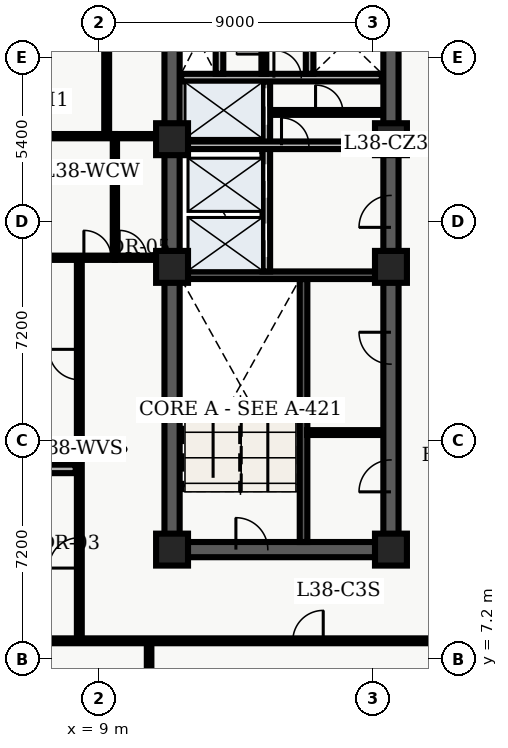
"""IFC4 building model, lengths in metres.
Left out: names, types, materials, properties, quantities, classifications, styles, units other than length and angle.
Written with IfcOpenShell. Run it as: python <this file> out.ifc"""

import sys

from ifc_helpers import new_model, entity, si_unit, converted_unit, direction, frame, origin_with_axes, origin_2d_with_axis, place, context, subcontext, project, spatial, polyline, rectangle, outline, extrude, element, fill, save


model = new_model("IFC4")
c1 = context("Model", 3, precision=1e-05, world=origin_with_axes(), true_north=direction((0.0, 1.0)))
c2 = subcontext(c1, "Body", "Model", "MODEL_VIEW")
j1 = project(units=[si_unit("LENGTHUNIT", "METRE"), converted_unit("PLANEANGLEUNIT", "DEGREE", entity("IfcPlaneAngleMeasure", 0.017), si_unit("PLANEANGLEUNIT", "RADIAN"), dimensions=[0, 0, 0, 0, 0, 0, 0])], contexts=[c1])
p1 = place(None, origin_with_axes())
s1 = spatial("IfcSite", under=j1, at=p1, CompositionType="ELEMENT")
p2 = place(p1, origin_with_axes())
s2 = spatial("IfcBuilding", under=s1, at=p2, CompositionType="ELEMENT")
p3 = place(p2, frame((0.0, 0.0, 156.3), z_axis=(0.0, 0.0, 1.0), x_axis=(1.0, 0.0, 0.0)))
s3 = spatial("IfcBuildingStorey", under=s2, at=p3, CompositionType="ELEMENT", Elevation=156.3)
p4 = place(p3, frame((11.4, 10.8, 0.0), z_axis=(0.0, 0.0, 1.0), x_axis=(0.0, 1.0, 0.0)))
e1 = element("IfcWall", 1, at=p4, inside=s3, PredefinedType="SHEAR", context=c2, shape_type="SweptSolid", body=[
    extrude(outline(polyline([(0.0, -0.25), (27.0, -0.25), (27.0, 0.25), (0.0, 0.25), (0.0, -0.25)])), origin_with_axes(), (0.0, 0.0, 1.0), 3.66),
])
p5 = place(p3, frame((11.4, 10.8, 0.0), z_axis=(0.0, 0.0, 1.0), x_axis=(1.0, 0.0, 0.0)))
e2 = element("IfcWall", 2, at=p5, inside=s3, PredefinedType="SHEAR", context=c2, shape_type="SweptSolid", body=[
    extrude(outline(polyline([(0.0, -0.25), (7.2, -0.25), (7.2, 0.25), (0.0, 0.25), (0.0, -0.25)])), origin_with_axes(), (0.0, 0.0, 1.0), 3.66),
])
p6 = place(p5, frame((2.625, 0.0, 0.0), z_axis=(0.0, 0.0, 1.0), x_axis=(1.0, 0.0, 0.0)))
e3 = element("IfcOpeningElement", 3, at=p6, cuts=e2, PredefinedType="OPENING", context=c2, shape_type="SweptSolid", body=[
    extrude(rectangle(XDim=1.05, YDim=0.52, at=origin_2d_with_axis()), origin_with_axes(), (0.0, 0.0, 1.0), 2.15),
])
p7 = place(p3, frame((18.6, 10.8, 0.0), z_axis=(0.0, 0.0, 1.0), x_axis=(0.0, 1.0, 0.0)))
e4 = element("IfcWall", 4, at=p7, inside=s3, PredefinedType="SHEAR", context=c2, shape_type="SweptSolid", body=[
    extrude(outline(polyline([(0.0, -0.25), (13.5, -0.25), (13.5, 0.25), (0.0, 0.25), (0.0, -0.25)])), origin_with_axes(), (0.0, 0.0, 1.0), 3.66),
])
p8 = place(p7, frame((11.125, 0.0, 0.0), z_axis=(0.0, 0.0, 1.0), x_axis=(1.0, 0.0, 0.0)))
e5 = element("IfcOpeningElement", 5, at=p8, cuts=e4, PredefinedType="OPENING", context=c2, shape_type="SweptSolid", body=[
    extrude(rectangle(XDim=1.05, YDim=0.52, at=origin_2d_with_axis()), origin_with_axes(), (0.0, 0.0, 1.0), 2.15),
])
p9 = place(p7, frame((2.425, 0.0, 0.0), z_axis=(0.0, 0.0, 1.0), x_axis=(1.0, 0.0, 0.0)))
e6 = element("IfcOpeningElement", 6, at=p9, cuts=e4, PredefinedType="OPENING", context=c2, shape_type="SweptSolid", body=[
    extrude(rectangle(XDim=1.05, YDim=0.52, at=origin_2d_with_axis()), origin_with_axes(), (0.0, 0.0, 1.0), 2.15),
])
p10 = place(p7, frame((6.625, 0.0, 0.0), z_axis=(0.0, 0.0, 1.0), x_axis=(1.0, 0.0, 0.0)))
e7 = element("IfcOpeningElement", 7, at=p10, cuts=e4, PredefinedType="OPENING", context=c2, shape_type="SweptSolid", body=[
    extrude(rectangle(XDim=1.05, YDim=0.52, at=origin_2d_with_axis()), origin_with_axes(), (0.0, 0.0, 1.0), 2.15),
])
p11 = place(p3, frame((18.6, 24.3, 0.0), z_axis=(0.0, 0.0, 1.0), x_axis=(0.0, 1.0, 0.0)))
e8 = element("IfcWall", 8, at=p11, inside=s3, PredefinedType="SHEAR", context=c2, shape_type="SweptSolid", body=[
    extrude(outline(polyline([(0.0, -0.25), (13.5, -0.25), (13.5, 0.25), (0.0, 0.25), (0.0, -0.25)])), origin_with_axes(), (0.0, 0.0, 1.0), 3.66),
])
p12 = place(p11, frame((5.65, 0.0, 0.0), z_axis=(0.0, 0.0, 1.0), x_axis=(1.0, 0.0, 0.0)))
e9 = element("IfcOpeningElement", 9, at=p12, cuts=e8, PredefinedType="OPENING", context=c2, shape_type="SweptSolid", body=[
    extrude(rectangle(XDim=1.1, YDim=0.52, at=origin_2d_with_axis()), origin_with_axes(), (0.0, 0.0, 1.0), 2.15),
])
p13 = place(p11, frame((7.75, 0.0, 0.0), z_axis=(0.0, 0.0, 1.0), x_axis=(1.0, 0.0, 0.0)))
e10 = element("IfcOpeningElement", 10, at=p13, cuts=e8, PredefinedType="OPENING", context=c2, shape_type="SweptSolid", body=[
    extrude(rectangle(XDim=1.1, YDim=0.52, at=origin_2d_with_axis()), origin_with_axes(), (0.0, 0.0, 1.0), 2.15),
])
p14 = place(p3, frame((15.725, 11.05, 0.0), z_axis=(0.0, 0.0, 1.0), x_axis=(0.0, 1.0, 0.0)))
e11 = element("IfcWall", 11, at=p14, inside=s3, PredefinedType="SHEAR", context=c2, shape_type="SweptSolid", body=[
    extrude(outline(polyline([(0.0, -0.125), (8.65, -0.125), (8.65, 0.125), (0.0, 0.125), (0.0, -0.125)])), origin_with_axes(), (0.0, 0.0, 1.0), 3.66),
])
p15 = place(p3, frame((11.65, 19.825, 0.0), z_axis=(0.0, 0.0, 1.0), x_axis=(1.0, 0.0, 0.0)))
e12 = element("IfcWall", 12, at=p15, inside=s3, PredefinedType="SHEAR", context=c2, shape_type="SweptSolid", body=[
    extrude(outline(polyline([(0.0, -0.125), (6.7, -0.125), (6.7, 0.125), (0.0, 0.125), (0.0, -0.125)])), origin_with_axes(), (0.0, 0.0, 1.0), 3.66),
])
p16 = place(p3, frame((14.5, 19.95, 0.0), z_axis=(0.0, 0.0, 1.0), x_axis=(0.0, 1.0, 0.0)))
e13 = element("IfcWall", 13, at=p16, inside=s3, PredefinedType="SOLIDWALL", context=c2, shape_type="SweptSolid", body=[
    extrude(outline(polyline([(0.0, -0.125), (6.25, -0.125), (6.25, 0.125), (0.0, 0.125), (0.0, -0.125)])), origin_with_axes(), (0.0, 0.0, 1.0), 2.7),
])
p17 = place(p16, frame((1.025, 0.0, 0.0), z_axis=(0.0, 0.0, 1.0), x_axis=(1.0, 0.0, 0.0)))
e14 = element("IfcOpeningElement", 14, at=p17, cuts=e13, PredefinedType="OPENING", context=c2, shape_type="SweptSolid", body=[
    extrude(rectangle(XDim=1.1, YDim=0.27, at=origin_2d_with_axis()), origin_with_axes(), (0.0, 0.0, 1.0), 2.15),
])
p18 = place(p16, frame((2.975, 0.0, 0.0), z_axis=(0.0, 0.0, 1.0), x_axis=(1.0, 0.0, 0.0)))
e15 = element("IfcOpeningElement", 15, at=p18, cuts=e13, PredefinedType="OPENING", context=c2, shape_type="SweptSolid", body=[
    extrude(rectangle(XDim=1.1, YDim=0.27, at=origin_2d_with_axis()), origin_with_axes(), (0.0, 0.0, 1.0), 2.15),
])
p19 = place(p16, frame((5.425, 0.0, 0.0), z_axis=(0.0, 0.0, 1.0), x_axis=(1.0, 0.0, 0.0)))
e16 = element("IfcOpeningElement", 16, at=p19, cuts=e13, PredefinedType="OPENING", context=c2, shape_type="SweptSolid", body=[
    extrude(rectangle(XDim=1.2, YDim=0.27, at=origin_2d_with_axis()), origin_with_axes(), (0.0, 0.0, 1.0), 2.15),
])
p20 = place(p3, frame((11.7, 24.1, 0.0), z_axis=(0.0, 0.0, 1.0), x_axis=(1.0, 0.0, 0.0)))
e17 = element("IfcWall", 17, at=p20, inside=s3, PredefinedType="SOLIDWALL", context=c2, shape_type="SweptSolid", body=[
    extrude(outline(polyline([(0.0, -0.125), (6.6, -0.125), (6.6, 0.125), (0.0, 0.125), (0.0, -0.125)])), origin_with_axes(), (0.0, 0.0, 1.0), 2.7),
])
p21 = place(p20, frame((3.75, 0.0, 0.0), z_axis=(0.0, 0.0, 1.0), x_axis=(1.0, 0.0, 0.0)))
e18 = element("IfcOpeningElement", 18, at=p21, cuts=e17, PredefinedType="OPENING", context=c2, shape_type="SweptSolid", body=[
    extrude(rectangle(XDim=0.9, YDim=0.27, at=origin_2d_with_axis()), origin_with_axes(), (0.0, 0.0, 1.0), 2.15),
])
p22 = place(p3, frame((11.7, 26.325, 0.0), z_axis=(0.0, 0.0, 1.0), x_axis=(1.0, 0.0, 0.0)))
e19 = element("IfcWall", 19, at=p22, inside=s3, PredefinedType="SOLIDWALL", context=c2, shape_type="SweptSolid", body=[
    extrude(outline(polyline([(0.0, -0.125), (6.6, -0.125), (6.6, 0.125), (0.0, 0.125), (0.0, -0.125)])), origin_with_axes(), (0.0, 0.0, 1.0), 2.7),
])
p23 = place(p22, frame((3.5, 0.0, 0.0), z_axis=(0.0, 0.0, 1.0), x_axis=(1.0, 0.0, 0.0)))
e20 = element("IfcOpeningElement", 20, at=p23, cuts=e19, PredefinedType="OPENING", context=c2, shape_type="SweptSolid", body=[
    extrude(rectangle(XDim=0.9, YDim=0.27, at=origin_2d_with_axis()), origin_with_axes(), (0.0, 0.0, 1.0), 2.15),
])
for number, where, z_axis, x_axis in (
    (21, (12.96, 26.45, 0.0), (0.0, 0.0, 1.0), (0.0, 1.0, 0.0)),
    (22, (15.925, 26.45, 0.0), (0.0, 0.0, 1.0), (0.0, 1.0, 0.0)),
):
    element("IfcWall", number, at=place(p3, frame(where, z_axis=z_axis, x_axis=x_axis)), inside=s3, PredefinedType="SOLIDWALL", context=c2, shape_type="SweptSolid", body=[
        extrude(outline(polyline([(0.0, -0.125), (2.2, -0.125), (2.2, 0.125), (0.0, 0.125), (0.0, -0.125)])), origin_with_axes(), (0.0, 0.0, 1.0), 2.7),
    ])
for number, where, z_axis, x_axis in (
    (23, (11.4, 10.8, 0.0), (0.0, 0.0, 1.0), (1.0, 0.0, 0.0)),
    (24, (11.4, 20.1, 0.0), (0.0, 0.0, 1.0), (1.0, 0.0, 0.0)),
    (25, (11.4, 24.3, 0.0), (0.0, 0.0, 1.0), (1.0, 0.0, 0.0)),
    (26, (18.6, 10.8, 0.0), (0.0, 0.0, 1.0), (1.0, 0.0, 0.0)),
    (27, (18.6, 20.1, 0.0), (0.0, 0.0, 1.0), (1.0, 0.0, 0.0)),
    (28, (18.6, 24.3, 0.0), (0.0, 0.0, 1.0), (1.0, 0.0, 0.0)),
):
    element("IfcColumn", number, at=place(p3, frame(where, z_axis=z_axis, x_axis=x_axis)), inside=s3, PredefinedType="COLUMN", context=c2, shape_type="SweptSolid", body=[
        extrude(rectangle(XDim=1.05, YDim=1.05, at=origin_2d_with_axis()), origin_with_axes(), (0.0, 0.0, 1.0), 3.9),
    ])
p24 = place(p3, frame((14.62, 25.18, 0.0), z_axis=(0.0, 0.0, 1.0), x_axis=(1.0, 0.0, 0.0)))
e29 = element("IfcWall", 29, at=p24, inside=s3, PredefinedType="PARTITIONING", context=c2, shape_type="SweptSolid", body=[
    extrude(outline(polyline([(0.0, -0.08), (3.68, -0.08), (3.68, 0.08), (0.0, 0.08), (0.0, -0.08)])), origin_with_axes(), (0.0, 0.0, 1.0), 2.7),
])
p25 = place(p24, frame((1.95, 0.0, 0.0), z_axis=(0.0, 0.0, 1.0), x_axis=(1.0, 0.0, 0.0)))
e30 = element("IfcOpeningElement", 30, at=p25, cuts=e29, PredefinedType="OPENING", context=c2, shape_type="SweptSolid", body=[
    extrude(rectangle(XDim=0.9, YDim=0.18, at=origin_2d_with_axis()), origin_with_axes(), (0.0, 0.0, 1.0), 2.15),
])
p26 = place(p3, frame((14.42, 26.45, 0.0), z_axis=(0.0, 0.0, 1.0), x_axis=(0.0, 1.0, 0.0)))
e31 = element("IfcWall", 31, at=p26, inside=s3, PredefinedType="PARTITIONING", context=c2, shape_type="SweptSolid", body=[
    extrude(outline(polyline([(0.0, -0.08), (2.2, -0.08), (2.2, 0.08), (0.0, 0.08), (0.0, -0.08)])), origin_with_axes(), (0.0, 0.0, 1.0), 2.7),
])
p27 = place(p26, frame((1.1, 0.0, 0.0), z_axis=(0.0, 0.0, 1.0), x_axis=(1.0, 0.0, 0.0)))
e32 = element("IfcOpeningElement", 32, at=p27, cuts=e31, PredefinedType="OPENING", context=c2, shape_type="SweptSolid", body=[
    extrude(rectangle(XDim=0.9, YDim=0.18, at=origin_2d_with_axis()), origin_with_axes(), (0.0, 0.0, 1.0), 2.15),
])
p28 = place(p3, frame((15.84, 14.65, 0.0), z_axis=(0.0, 0.0, 1.0), x_axis=(1.0, 0.0, 0.0)))
e33 = element("IfcWall", 33, at=p28, inside=s3, PredefinedType="PARTITIONING", context=c2, shape_type="SweptSolid", body=[
    extrude(outline(polyline([(0.0, -0.08), (2.46, -0.08), (2.46, 0.08), (0.0, 0.08), (0.0, -0.08)])), origin_with_axes(), (0.0, 0.0, 1.0), 2.7),
])
p29 = place(p3, frame((9.52, 20.4, 0.0), z_axis=(0.0, 0.0, 1.0), x_axis=(0.0, 1.0, 0.0)))
e34 = element("IfcWall", 34, at=p29, inside=s3, PredefinedType="PARTITIONING", context=c2, shape_type="SweptSolid", body=[
    extrude(outline(polyline([(0.0, -0.07), (4.0, -0.07), (4.0, 0.07), (0.0, 0.07), (0.0, -0.07)])), origin_with_axes(), (0.0, 0.0, 1.0), 2.7),
])
p30 = place(p3, frame((9.52, 20.4, 0.0), z_axis=(0.0, 0.0, 1.0), x_axis=(1.0, 0.0, 0.0)))
e35 = element("IfcWall", 35, at=p30, inside=s3, PredefinedType="PARTITIONING", context=c2, shape_type="SweptSolid", body=[
    extrude(outline(polyline([(0.0, -0.07), (1.58, -0.07), (1.58, 0.07), (0.0, 0.07), (0.0, -0.07)])), origin_with_axes(), (0.0, 0.0, 1.0), 2.7),
])
p31 = place(p30, frame((0.59, 0.0, 0.0), z_axis=(0.0, 0.0, 1.0), x_axis=(1.0, 0.0, 0.0)))
e36 = element("IfcOpeningElement", 36, at=p31, cuts=e35, PredefinedType="OPENING", context=c2, shape_type="SweptSolid", body=[
    extrude(rectangle(XDim=0.9, YDim=0.16, at=origin_2d_with_axis()), origin_with_axes(), (0.0, 0.0, 1.0), 2.15),
])
p32 = place(p3, frame((9.52, 24.4, 0.0), z_axis=(0.0, 0.0, 1.0), x_axis=(1.0, 0.0, 0.0)))
e37 = element("IfcWall", 37, at=p32, inside=s3, PredefinedType="PARTITIONING", context=c2, shape_type="SweptSolid", body=[
    extrude(outline(polyline([(0.0, -0.07), (1.58, -0.07), (1.58, 0.07), (0.0, 0.07), (0.0, -0.07)])), origin_with_axes(), (0.0, 0.0, 1.0), 2.7),
])
p33 = place(p3, frame((2.6, 7.8, 0.0), z_axis=(0.0, 0.0, 1.0), x_axis=(1.0, 0.0, 0.0)))
e38 = element("IfcWall", 38, at=p33, inside=s3, PredefinedType="PARTITIONING", context=c2, shape_type="SweptSolid", body=[
    extrude(outline(polyline([(0.0, -0.08), (18.55, -0.08), (18.55, 0.08), (0.0, 0.08), (0.0, -0.08)])), origin_with_axes(), (0.0, 0.0, 1.0), 2.7),
])
p34 = place(p33, frame((3.737, 0.0, 0.0), z_axis=(0.0, 0.0, 1.0), x_axis=(1.0, 0.0, 0.0)))
e39 = element("IfcOpeningElement", 39, at=p34, cuts=e38, PredefinedType="OPENING", context=c2, shape_type="SweptSolid", body=[
    extrude(rectangle(XDim=1.0, YDim=0.18, at=origin_2d_with_axis()), origin_with_axes(), (0.0, 0.0, 1.0), 2.15),
])
p35 = place(p33, frame((13.273, 0.0, 0.0), z_axis=(0.0, 0.0, 1.0), x_axis=(1.0, 0.0, 0.0)))
e40 = element("IfcOpeningElement", 40, at=p35, cuts=e38, PredefinedType="OPENING", context=c2, shape_type="SweptSolid", body=[
    extrude(rectangle(XDim=1.0, YDim=0.18, at=origin_2d_with_axis()), origin_with_axes(), (0.0, 0.0, 1.0), 2.15),
])
p36 = place(p3, frame((8.35, 7.8, 0.0), z_axis=(0.0, 0.0, 1.0), x_axis=(0.0, 1.0, 0.0)))
e41 = element("IfcWall", 41, at=p36, inside=s3, PredefinedType="PARTITIONING", context=c2, shape_type="SweptSolid", body=[
    extrude(outline(polyline([(0.0, -0.08), (12.6, -0.08), (12.6, 0.08), (0.0, 0.08), (0.0, -0.08)])), origin_with_axes(), (0.0, 0.0, 1.0), 2.7),
])
p37 = place(p36, frame((2.893, 0.0, 0.0), z_axis=(0.0, 0.0, 1.0), x_axis=(1.0, 0.0, 0.0)))
e42 = element("IfcOpeningElement", 42, at=p37, cuts=e41, PredefinedType="OPENING", context=c2, shape_type="SweptSolid", body=[
    extrude(rectangle(XDim=1.0, YDim=0.18, at=origin_2d_with_axis()), origin_with_axes(), (0.0, 0.0, 1.0), 2.15),
])
p38 = place(p36, frame((9.088, 0.0, 0.0), z_axis=(0.0, 0.0, 1.0), x_axis=(1.0, 0.0, 0.0)))
e43 = element("IfcOpeningElement", 43, at=p38, cuts=e41, PredefinedType="OPENING", context=c2, shape_type="SweptSolid", body=[
    extrude(rectangle(XDim=1.0, YDim=0.18, at=origin_2d_with_axis()), origin_with_axes(), (0.0, 0.0, 1.0), 2.15),
])
p39 = place(p3, frame((9.25, 24.4, 0.0), z_axis=(0.0, 0.0, 1.0), x_axis=(0.0, 1.0, 0.0)))
e44 = element("IfcWall", 44, at=p39, inside=s3, PredefinedType="PARTITIONING", context=c2, shape_type="SweptSolid", body=[
    extrude(outline(polyline([(0.0, -0.08), (16.1, -0.08), (16.1, 0.08), (0.0, 0.08), (0.0, -0.08)])), origin_with_axes(), (0.0, 0.0, 1.0), 2.7),
])
p40 = place(p39, frame((3.567, 0.0, 0.0), z_axis=(0.0, 0.0, 1.0), x_axis=(1.0, 0.0, 0.0)))
e45 = element("IfcOpeningElement", 45, at=p40, cuts=e44, PredefinedType="OPENING", context=c2, shape_type="SweptSolid", body=[
    extrude(rectangle(XDim=1.0, YDim=0.18, at=origin_2d_with_axis()), origin_with_axes(), (0.0, 0.0, 1.0), 2.15),
])
p41 = place(p39, frame((11.512, 0.0, 0.0), z_axis=(0.0, 0.0, 1.0), x_axis=(1.0, 0.0, 0.0)))
e46 = element("IfcOpeningElement", 46, at=p41, cuts=e44, PredefinedType="OPENING", context=c2, shape_type="SweptSolid", body=[
    extrude(rectangle(XDim=1.0, YDim=0.18, at=origin_2d_with_axis()), origin_with_axes(), (0.0, 0.0, 1.0), 2.15),
])
p42 = place(p3, frame((0.335, 20.4, 0.0), z_axis=(0.0, 0.0, 1.0), x_axis=(1.0, 0.0, 0.0)))
e47 = element("IfcWall", 47, at=p42, inside=s3, PredefinedType="PARTITIONING", context=c2, shape_type="SweptSolid", body=[
    extrude(outline(polyline([(0.0, -0.07), (9.185, -0.07), (9.185, 0.07), (0.0, 0.07), (0.0, -0.07)])), origin_with_axes(), (0.0, 0.0, 1.0), 2.7),
])
p43 = place(p42, frame((8.615, 0.0, 0.0), z_axis=(0.0, 0.0, 1.0), x_axis=(1.0, 0.0, 0.0)))
e48 = element("IfcOpeningElement", 48, at=p43, cuts=e47, PredefinedType="OPENING", context=c2, shape_type="SweptSolid", body=[
    extrude(rectangle(XDim=0.9, YDim=0.16, at=origin_2d_with_axis()), origin_with_axes(), (0.0, 0.0, 1.0), 2.15),
])
p44 = place(p3, frame((0.335, 24.4, 0.0), z_axis=(0.0, 0.0, 1.0), x_axis=(1.0, 0.0, 0.0)))
e49 = element("IfcWall", 49, at=p44, inside=s3, PredefinedType="PARTITIONING", context=c2, shape_type="SweptSolid", body=[
    extrude(outline(polyline([(0.0, -0.07), (9.185, -0.07), (9.185, 0.07), (0.0, 0.07), (0.0, -0.07)])), origin_with_axes(), (0.0, 0.0, 1.0), 2.7),
])
p45 = place(p3, frame((0.335, 13.455, 0.0), z_axis=(0.0, 0.0, 1.0), x_axis=(1.0, 0.0, 0.0)))
e50 = element("IfcWall", 50, at=p45, inside=s3, PredefinedType="PARTITIONING", context=c2, shape_type="SweptSolid", body=[
    extrude(outline(polyline([(0.0, -0.14), (7.895, -0.14), (7.895, 0.14), (0.0, 0.14), (0.0, -0.14)])), origin_with_axes(), (0.0, 0.0, 1.0), 2.7),
])
p46 = place(p3, frame((10.645, 0.335, 0.0), z_axis=(0.0, 0.0, 1.0), x_axis=(0.0, 1.0, 0.0)))
e51 = element("IfcWall", 51, at=p46, inside=s3, PredefinedType="PARTITIONING", context=c2, shape_type="SweptSolid", body=[
    extrude(outline(polyline([(0.0, -0.075), (7.365, -0.075), (7.365, 0.075), (0.0, 0.075), (0.0, -0.075)])), origin_with_axes(), (0.0, 0.0, 1.0), 2.7),
])
p47 = place(p16, frame((1.025, 0.0, 0.0), z_axis=(0.0, 0.0, 1.0), x_axis=(1.0, 0.0, 0.0)))
e52 = element("IfcDoor", 52, at=p47, inside=s3, OperationType="SLIDING_TO_LEFT", PredefinedType="DOOR", context=c2, shape_type="SweptSolid", body=[
    extrude(rectangle(XDim=1.1, YDim=0.09, at=origin_2d_with_axis()), origin_with_axes(), (0.0, 0.0, 1.0), 2.15),
])
fill(e14, e52)
p48 = place(p16, frame((2.975, 0.0, 0.0), z_axis=(0.0, 0.0, 1.0), x_axis=(1.0, 0.0, 0.0)))
e53 = element("IfcDoor", 53, at=p48, inside=s3, OperationType="SLIDING_TO_RIGHT", PredefinedType="DOOR", context=c2, shape_type="SweptSolid", body=[
    extrude(rectangle(XDim=1.1, YDim=0.09, at=origin_2d_with_axis()), origin_with_axes(), (0.0, 0.0, 1.0), 2.15),
])
fill(e15, e53)
p49 = place(p16, frame((5.425, 0.0, 0.0), z_axis=(0.0, 0.0, 1.0), x_axis=(1.0, 0.0, 0.0)))
e54 = element("IfcDoor", 54, at=p49, inside=s3, OperationType="DOUBLE_DOOR_SLIDING", PredefinedType="DOOR", context=c2, shape_type="SweptSolid", body=[
    extrude(rectangle(XDim=1.2, YDim=0.09, at=origin_2d_with_axis()), origin_with_axes(), (0.0, 0.0, 1.0), 2.15),
])
fill(e16, e54)
p50 = place(p5, frame((2.625, 0.0, 0.0), z_axis=(0.0, 0.0, 1.0), x_axis=(1.0, 0.0, 0.0)))
e55 = element("IfcDoor", 55, at=p50, inside=s3, OperationType="SINGLE_SWING_LEFT", PredefinedType="DOOR", context=c2, shape_type="SweptSolid", body=[
    extrude(rectangle(XDim=1.05, YDim=0.09, at=origin_2d_with_axis()), origin_with_axes(), (0.0, 0.0, 1.0), 2.15),
])
fill(e3, e55)
p51 = place(p7, frame((11.125, 0.0, 0.0), z_axis=(0.0, 0.0, 1.0), x_axis=(1.0, 0.0, 0.0)))
e56 = element("IfcDoor", 56, at=p51, inside=s3, OperationType="SINGLE_SWING_LEFT", PredefinedType="DOOR", context=c2, shape_type="SweptSolid", body=[
    extrude(rectangle(XDim=1.05, YDim=0.09, at=origin_2d_with_axis()), origin_with_axes(), (0.0, 0.0, 1.0), 2.15),
])
fill(e5, e56)
p52 = place(p22, frame((3.5, 0.0, 0.0), z_axis=(0.0, 0.0, 1.0), x_axis=(1.0, 0.0, 0.0)))
e57 = element("IfcDoor", 57, at=p52, inside=s3, OperationType="SINGLE_SWING_LEFT", PredefinedType="DOOR", context=c2, shape_type="SweptSolid", body=[
    extrude(rectangle(XDim=0.9, YDim=0.09, at=origin_2d_with_axis()), origin_with_axes(), (0.0, 0.0, 1.0), 2.15),
])
fill(e20, e57)
p53 = place(p26, frame((1.1, 0.0, 0.0), z_axis=(0.0, 0.0, 1.0), x_axis=(1.0, 0.0, 0.0)))
e58 = element("IfcDoor", 58, at=p53, inside=s3, OperationType="SINGLE_SWING_LEFT", PredefinedType="DOOR", context=c2, shape_type="SweptSolid", body=[
    extrude(rectangle(XDim=0.9, YDim=0.09, at=origin_2d_with_axis()), origin_with_axes(), (0.0, 0.0, 1.0), 2.15),
])
fill(e32, e58)
p54 = place(p20, frame((3.75, 0.0, 0.0), z_axis=(0.0, 0.0, 1.0), x_axis=(1.0, 0.0, 0.0)))
e59 = element("IfcDoor", 59, at=p54, inside=s3, OperationType="SINGLE_SWING_LEFT", PredefinedType="DOOR", context=c2, shape_type="SweptSolid", body=[
    extrude(rectangle(XDim=0.9, YDim=0.09, at=origin_2d_with_axis()), origin_with_axes(), (0.0, 0.0, 1.0), 2.15),
])
fill(e18, e59)
p55 = place(p24, frame((1.95, 0.0, 0.0), z_axis=(0.0, 0.0, 1.0), x_axis=(1.0, 0.0, 0.0)))
e60 = element("IfcDoor", 60, at=p55, inside=s3, OperationType="SINGLE_SWING_LEFT", PredefinedType="DOOR", context=c2, shape_type="SweptSolid", body=[
    extrude(rectangle(XDim=0.9, YDim=0.09, at=origin_2d_with_axis()), origin_with_axes(), (0.0, 0.0, 1.0), 2.15),
])
fill(e30, e60)
p56 = place(p7, frame((2.425, 0.0, 0.0), z_axis=(0.0, 0.0, 1.0), x_axis=(1.0, 0.0, 0.0)))
e61 = element("IfcDoor", 61, at=p56, inside=s3, OperationType="SINGLE_SWING_LEFT", PredefinedType="DOOR", context=c2, shape_type="SweptSolid", body=[
    extrude(rectangle(XDim=1.05, YDim=0.09, at=origin_2d_with_axis()), origin_with_axes(), (0.0, 0.0, 1.0), 2.15),
])
fill(e6, e61)
p57 = place(p7, frame((6.625, 0.0, 0.0), z_axis=(0.0, 0.0, 1.0), x_axis=(1.0, 0.0, 0.0)))
e62 = element("IfcDoor", 62, at=p57, inside=s3, OperationType="SINGLE_SWING_RIGHT", PredefinedType="DOOR", context=c2, shape_type="SweptSolid", body=[
    extrude(rectangle(XDim=1.05, YDim=0.09, at=origin_2d_with_axis()), origin_with_axes(), (0.0, 0.0, 1.0), 2.15),
])
fill(e7, e62)
p58 = place(p30, frame((0.59, 0.0, 0.0), z_axis=(0.0, 0.0, 1.0), x_axis=(1.0, 0.0, 0.0)))
e63 = element("IfcDoor", 63, at=p58, inside=s3, OperationType="SINGLE_SWING_LEFT", PredefinedType="DOOR", context=c2, shape_type="SweptSolid", body=[
    extrude(rectangle(XDim=0.9, YDim=0.084, at=origin_2d_with_axis()), origin_with_axes(), (0.0, 0.0, 1.0), 2.15),
])
fill(e36, e63)
p59 = place(p42, frame((8.615, 0.0, 0.0), z_axis=(0.0, 0.0, 1.0), x_axis=(1.0, 0.0, 0.0)))
e64 = element("IfcDoor", 64, at=p59, inside=s3, OperationType="SINGLE_SWING_LEFT", PredefinedType="DOOR", context=c2, shape_type="SweptSolid", body=[
    extrude(rectangle(XDim=0.9, YDim=0.084, at=origin_2d_with_axis()), origin_with_axes(), (0.0, 0.0, 1.0), 2.15),
])
fill(e48, e64)
p60 = place(p36, frame((2.893, 0.0, 0.0), z_axis=(0.0, 0.0, 1.0), x_axis=(1.0, 0.0, 0.0)))
e65 = element("IfcDoor", 65, at=p60, inside=s3, OperationType="SINGLE_SWING_LEFT", PredefinedType="DOOR", context=c2, shape_type="SweptSolid", body=[
    extrude(rectangle(XDim=1.0, YDim=0.09, at=origin_2d_with_axis()), origin_with_axes(), (0.0, 0.0, 1.0), 2.15),
])
fill(e42, e65)
p61 = place(p36, frame((9.088, 0.0, 0.0), z_axis=(0.0, 0.0, 1.0), x_axis=(1.0, 0.0, 0.0)))
e66 = element("IfcDoor", 66, at=p61, inside=s3, OperationType="SINGLE_SWING_RIGHT", PredefinedType="DOOR", context=c2, shape_type="SweptSolid", body=[
    extrude(rectangle(XDim=1.0, YDim=0.09, at=origin_2d_with_axis()), origin_with_axes(), (0.0, 0.0, 1.0), 2.15),
])
fill(e43, e66)
p62 = place(p33, frame((13.273, 0.0, 0.0), z_axis=(0.0, 0.0, 1.0), x_axis=(1.0, 0.0, 0.0)))
e67 = element("IfcDoor", 67, at=p62, inside=s3, OperationType="SINGLE_SWING_RIGHT", PredefinedType="DOOR", context=c2, shape_type="SweptSolid", body=[
    extrude(rectangle(XDim=1.0, YDim=0.09, at=origin_2d_with_axis()), origin_with_axes(), (0.0, 0.0, 1.0), 2.15),
])
fill(e40, e67)
save(model, sys.argv[1])
